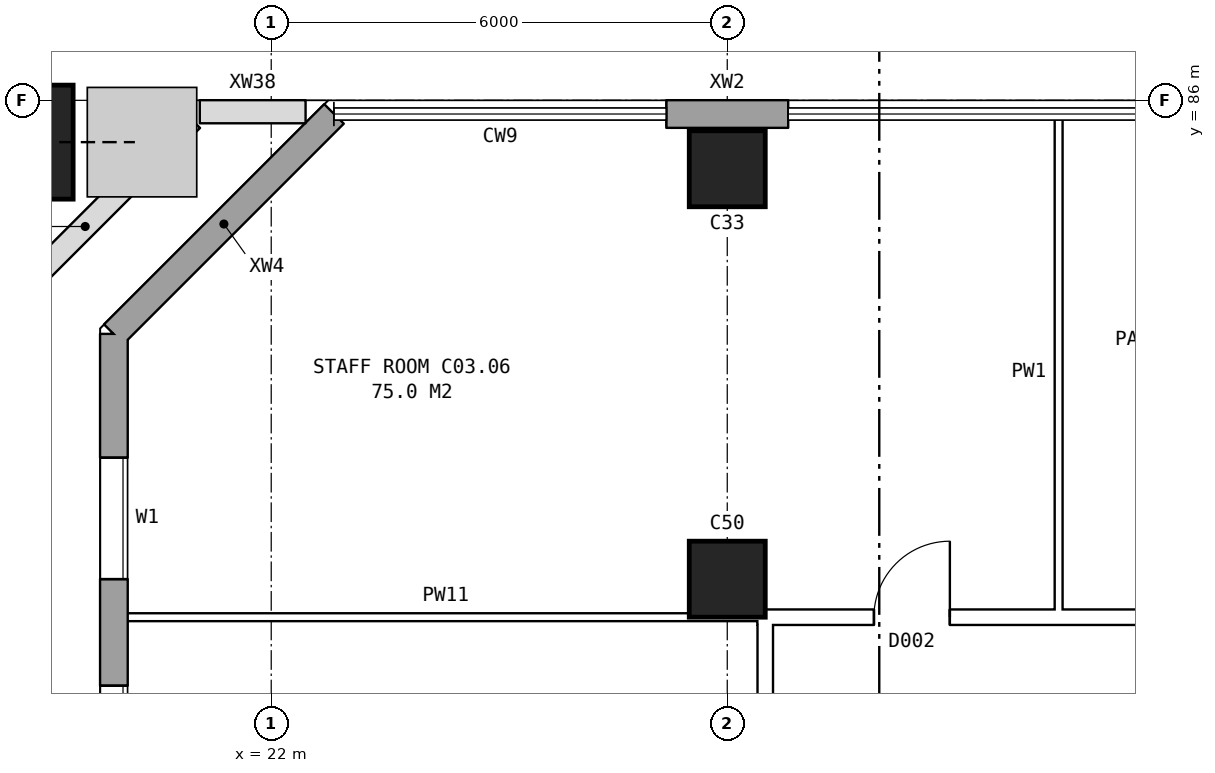
"""IFC4 building model, lengths in metres.
Left out: names, types, materials, properties, quantities, classifications, styles, units other than length and angle.
Written with IfcOpenShell. Run it as: python <this file> out.ifc"""

import sys

from ifc_helpers import new_model, si_unit, direction, frame, frame_2d, origin, origin_2d, place, context, subcontext, project, spatial, rectangle, hollow_rectangle, extrude, element, fill, save


model = new_model("IFC4")
c1 = context("Model", 3, precision=1e-05, world=origin(), true_north=direction((0.0, 1.0)))
c2 = subcontext(c1, "Body", "Model", "MODEL_VIEW")
j1 = project(units=[si_unit("LENGTHUNIT", "METRE"), si_unit("PLANEANGLEUNIT", "RADIAN")], contexts=[c1])
p1 = place(None, origin())
s1 = spatial("IfcSite", under=j1, at=p1, CompositionType="ELEMENT")
p2 = place(p1, origin())
s2 = spatial("IfcBuilding", under=s1, at=p2, CompositionType="ELEMENT")
p3 = place(p2, frame((0.0, 0.0, 14.7)))
s3 = spatial("IfcBuildingStorey", under=s2, at=p3, CompositionType="ELEMENT", Elevation=14.7)
for number, where, z_axis, x_axis in (
    (1, (28.0, 79.7, 0.0), (0.0, 0.0, 1.0), (1.0, 0.0, 0.0)),
    (2, (28.0, 85.1, 0.0), (0.0, 0.0, 1.0), (1.0, 0.0, 0.0)),
):
    element("IfcColumn", number, at=place(p3, frame(where, z_axis=z_axis, x_axis=x_axis)), inside=s3, PredefinedType="COLUMN", context=c2, shape_type="SweptSolid", body=[
        extrude(rectangle(XDim=1.0, YDim=1.0, at=origin_2d()), origin(), (0.0, 0.0, 1.0), 4.0),
    ])
p4 = place(p3, frame((18.644, 85.45, 0.257), z_axis=(0.342481981042, 0.0, 0.939524397055), x_axis=(0.0, 1.0, 0.0)))
e3 = element("IfcColumn", 3, at=p4, inside=s3, PredefinedType="COLUMN", context=c2, shape_type="SweptSolid", body=[
    extrude(hollow_rectangle(XDim=1.5, YDim=1.5, WallThickness=0.08, at=origin_2d()), origin(), (0.0, 0.0, 1.0), 4.562),
])
p5 = place(p3, frame((28.8, 85.82, 0.0), z_axis=(0.0, 0.0, 1.0), x_axis=(-1.0, 0.0, 0.0)))
e4 = element("IfcWall", 4, at=p5, inside=s3, PredefinedType="STANDARD", context=c2, shape_type="SweptSolid", body=[
    extrude(rectangle(XDim=1.6, YDim=0.36, at=frame_2d((0.8, 0.0))), origin(), (0.0, 0.0, 1.0), 4.0),
])
p6 = place(p3, frame((22.825, 85.82, 0.0), z_axis=(0.0, 0.0, 1.0), x_axis=(-0.707106781187, -0.707106781187, 0.0)))
e5 = element("IfcWall", 5, at=p6, inside=s3, PredefinedType="STANDARD", context=c2, shape_type="SweptSolid", body=[
    extrude(rectangle(XDim=4.094, YDim=0.36, at=frame_2d((2.047, 0.0))), origin(), (0.0, 0.0, 1.0), 4.0),
])
p7 = place(p3, frame((19.93, 82.925, 0.0), z_axis=(0.0, 0.0, 1.0), x_axis=(0.0, -1.0, 0.0)))
e6 = element("IfcWall", 6, at=p7, inside=s3, PredefinedType="STANDARD", context=c2, shape_type="SweptSolid", body=[
    extrude(rectangle(XDim=25.851, YDim=0.36, at=frame_2d((12.925, 0.0))), origin(), (0.0, 0.0, 1.0), 4.0),
])
p8 = place(p7, frame((1.625, 0.0, 0.8)))
e7 = element("IfcOpeningElement", 7, at=p8, cuts=e6, PredefinedType="OPENING", context=c2, shape_type="SweptSolid", body=[
    extrude(rectangle(XDim=1.6, YDim=1.8, at=frame_2d((0.8, 0.9))), frame((0.0, 0.19, 0.0), z_axis=(0.0, -1.0, 0.0), x_axis=(1.0, 0.0, 0.0)), (0.0, 0.0, 1.0), 0.38),
])
p9 = place(p7, frame((4.625, 0.0, 0.8)))
e8 = element("IfcOpeningElement", 8, at=p9, cuts=e6, PredefinedType="OPENING", context=c2, shape_type="SweptSolid", body=[
    extrude(rectangle(XDim=1.6, YDim=1.8, at=frame_2d((0.8, 0.9))), frame((0.0, 0.19, 0.0), z_axis=(0.0, -1.0, 0.0), x_axis=(1.0, 0.0, 0.0)), (0.0, 0.0, 1.0), 0.38),
])
p10 = place(p7, frame((7.625, 0.0, 0.8)))
e9 = element("IfcOpeningElement", 9, at=p10, cuts=e6, PredefinedType="OPENING", context=c2, shape_type="SweptSolid", body=[
    extrude(rectangle(XDim=1.6, YDim=1.8, at=frame_2d((0.8, 0.9))), frame((0.0, 0.19, 0.0), z_axis=(0.0, -1.0, 0.0), x_axis=(1.0, 0.0, 0.0)), (0.0, 0.0, 1.0), 0.38),
])
p11 = place(p7, frame((10.625, 0.0, 0.8)))
e10 = element("IfcOpeningElement", 10, at=p11, cuts=e6, PredefinedType="OPENING", context=c2, shape_type="SweptSolid", body=[
    extrude(rectangle(XDim=1.6, YDim=1.8, at=frame_2d((0.8, 0.9))), frame((0.0, 0.19, 0.0), z_axis=(0.0, -1.0, 0.0), x_axis=(1.0, 0.0, 0.0)), (0.0, 0.0, 1.0), 0.38),
])
p12 = place(p7, frame((13.625, 0.0, 0.8)))
e11 = element("IfcOpeningElement", 11, at=p12, cuts=e6, PredefinedType="OPENING", context=c2, shape_type="SweptSolid", body=[
    extrude(rectangle(XDim=1.6, YDim=1.8, at=frame_2d((0.8, 0.9))), frame((0.0, 0.19, 0.0), z_axis=(0.0, -1.0, 0.0), x_axis=(1.0, 0.0, 0.0)), (0.0, 0.0, 1.0), 0.38),
])
p13 = place(p7, frame((16.625, 0.0, 0.8)))
e12 = element("IfcOpeningElement", 12, at=p13, cuts=e6, PredefinedType="OPENING", context=c2, shape_type="SweptSolid", body=[
    extrude(rectangle(XDim=1.6, YDim=1.8, at=frame_2d((0.8, 0.9))), frame((0.0, 0.19, 0.0), z_axis=(0.0, -1.0, 0.0), x_axis=(1.0, 0.0, 0.0)), (0.0, 0.0, 1.0), 0.38),
])
p14 = place(p7, frame((19.625, 0.0, 0.8)))
e13 = element("IfcOpeningElement", 13, at=p14, cuts=e6, PredefinedType="OPENING", context=c2, shape_type="SweptSolid", body=[
    extrude(rectangle(XDim=1.6, YDim=1.8, at=frame_2d((0.8, 0.9))), frame((0.0, 0.19, 0.0), z_axis=(0.0, -1.0, 0.0), x_axis=(1.0, 0.0, 0.0)), (0.0, 0.0, 1.0), 0.38),
])
p15 = place(p7, frame((22.625, 0.0, 0.8)))
e14 = element("IfcOpeningElement", 14, at=p15, cuts=e6, PredefinedType="OPENING", context=c2, shape_type="SweptSolid", body=[
    extrude(rectangle(XDim=1.6, YDim=1.8, at=frame_2d((0.8, 0.9))), frame((0.0, 0.19, 0.0), z_axis=(0.0, -1.0, 0.0), x_axis=(1.0, 0.0, 0.0)), (0.0, 0.0, 1.0), 0.38),
])
p16 = place(p3, frame((22.45, 85.85, 0.0), z_axis=(0.0, 0.0, 1.0), x_axis=(-1.0, 0.0, 0.0)))
e15 = element("IfcWall", 15, at=p16, inside=s3, PredefinedType="PARAPET", context=c2, shape_type="SweptSolid", body=[
    extrude(rectangle(XDim=1.388, YDim=0.3, at=frame_2d((0.694, 0.0))), origin(), (0.0, 0.0, 1.0), 1.1),
])
p17 = place(p3, frame((20.955, 85.742, 0.0), z_axis=(0.0, 0.0, 1.0), x_axis=(-0.707137557743, -0.70707600329, 0.0)))
e16 = element("IfcWall", 16, at=p17, inside=s3, PredefinedType="PARAPET", context=c2, shape_type="SweptSolid", body=[
    extrude(rectangle(XDim=3.966, YDim=0.3, at=frame_2d((1.983, 0.0))), origin(), (0.0, 0.0, 1.0), 1.1),
])
p18 = place(p3, frame((28.398, 79.2, 0.0), z_axis=(0.0, 0.0, 1.0), x_axis=(1.0, 0.0, 0.0)))
e17 = element("IfcWall", 17, at=p18, inside=s3, PredefinedType="PARTITIONING", context=c2, shape_type="SweptSolid", body=[
    extrude(rectangle(XDim=47.362, YDim=0.2, at=frame_2d((23.681, 0.0))), origin(), (0.0, 0.0, 1.0), 4.0),
])
p19 = place(p18, frame((1.531, 0.0, 0.0)))
e18 = element("IfcOpeningElement", 18, at=p19, cuts=e17, PredefinedType="OPENING", context=c2, shape_type="SweptSolid", body=[
    extrude(rectangle(XDim=1.0, YDim=2.1, at=frame_2d((0.5, 1.05))), frame((0.0, 0.11, 0.0), z_axis=(0.0, -1.0, 0.0), x_axis=(1.0, 0.0, 0.0)), (0.0, 0.0, 1.0), 0.22),
])
p20 = place(p18, frame((5.782, 0.0, 0.0)))
e19 = element("IfcOpeningElement", 19, at=p20, cuts=e17, PredefinedType="OPENING", context=c2, shape_type="SweptSolid", body=[
    extrude(rectangle(XDim=1.0, YDim=2.1, at=frame_2d((0.5, 1.05))), frame((0.0, 0.11, 0.0), z_axis=(0.0, -1.0, 0.0), x_axis=(1.0, 0.0, 0.0)), (0.0, 0.0, 1.0), 0.22),
])
p21 = place(p18, frame((12.502, 0.0, 0.0)))
e20 = element("IfcOpeningElement", 20, at=p21, cuts=e17, PredefinedType="OPENING", context=c2, shape_type="SweptSolid", body=[
    extrude(rectangle(XDim=1.0, YDim=2.1, at=frame_2d((0.5, 1.05))), frame((0.0, 0.11, 0.0), z_axis=(0.0, -1.0, 0.0), x_axis=(1.0, 0.0, 0.0)), (0.0, 0.0, 1.0), 0.22),
])
p22 = place(p18, frame((17.102, 0.0, 0.0)))
e21 = element("IfcOpeningElement", 21, at=p22, cuts=e17, PredefinedType="OPENING", context=c2, shape_type="SweptSolid", body=[
    extrude(rectangle(XDim=1.0, YDim=2.1, at=frame_2d((0.5, 1.05))), frame((0.0, 0.11, 0.0), z_axis=(0.0, -1.0, 0.0), x_axis=(1.0, 0.0, 0.0)), (0.0, 0.0, 1.0), 0.22),
])
p23 = place(p18, frame((23.102, 0.0, 0.0)))
e22 = element("IfcOpeningElement", 22, at=p23, cuts=e17, PredefinedType="OPENING", context=c2, shape_type="SweptSolid", body=[
    extrude(rectangle(XDim=1.0, YDim=2.1, at=frame_2d((0.5, 1.05))), frame((0.0, 0.11, 0.0), z_axis=(0.0, -1.0, 0.0), x_axis=(1.0, 0.0, 0.0)), (0.0, 0.0, 1.0), 0.22),
])
p24 = place(p18, frame((29.102, 0.0, 0.0)))
e23 = element("IfcOpeningElement", 23, at=p24, cuts=e17, PredefinedType="OPENING", context=c2, shape_type="SweptSolid", body=[
    extrude(rectangle(XDim=1.0, YDim=2.1, at=frame_2d((0.5, 1.05))), frame((0.0, 0.11, 0.0), z_axis=(0.0, -1.0, 0.0), x_axis=(1.0, 0.0, 0.0)), (0.0, 0.0, 1.0), 0.22),
])
p25 = place(p18, frame((33.652, 0.0, 0.0)))
e24 = element("IfcOpeningElement", 24, at=p25, cuts=e17, PredefinedType="OPENING", context=c2, shape_type="SweptSolid", body=[
    extrude(rectangle(XDim=1.0, YDim=2.1, at=frame_2d((0.5, 1.05))), frame((0.0, 0.11, 0.0), z_axis=(0.0, -1.0, 0.0), x_axis=(1.0, 0.0, 0.0)), (0.0, 0.0, 1.0), 0.22),
])
p26 = place(p18, frame((36.652, 0.0, 0.0)))
e25 = element("IfcOpeningElement", 25, at=p26, cuts=e17, PredefinedType="OPENING", context=c2, shape_type="SweptSolid", body=[
    extrude(rectangle(XDim=1.0, YDim=2.1, at=frame_2d((0.5, 1.05))), frame((0.0, 0.11, 0.0), z_axis=(0.0, -1.0, 0.0), x_axis=(1.0, 0.0, 0.0)), (0.0, 0.0, 1.0), 0.22),
])
p27 = place(p18, frame((39.602, 0.0, 0.0)))
e26 = element("IfcOpeningElement", 26, at=p27, cuts=e17, PredefinedType="OPENING", context=c2, shape_type="SweptSolid", body=[
    extrude(rectangle(XDim=1.0, YDim=2.1, at=frame_2d((0.5, 1.05))), frame((0.0, 0.11, 0.0), z_axis=(0.0, -1.0, 0.0), x_axis=(1.0, 0.0, 0.0)), (0.0, 0.0, 1.0), 0.22),
])
p28 = place(p18, frame((42.502, 0.0, 0.0)))
e27 = element("IfcOpeningElement", 27, at=p28, cuts=e17, PredefinedType="OPENING", context=c2, shape_type="SweptSolid", body=[
    extrude(rectangle(XDim=1.0, YDim=2.1, at=frame_2d((0.5, 1.05))), frame((0.0, 0.11, 0.0), z_axis=(0.0, -1.0, 0.0), x_axis=(1.0, 0.0, 0.0)), (0.0, 0.0, 1.0), 0.22),
])
p29 = place(p18, frame((45.322, 0.0, 0.0)))
e28 = element("IfcOpeningElement", 28, at=p29, cuts=e17, PredefinedType="OPENING", context=c2, shape_type="SweptSolid", body=[
    extrude(rectangle(XDim=1.0, YDim=2.1, at=frame_2d((0.5, 1.05))), frame((0.0, 0.11, 0.0), z_axis=(0.0, -1.0, 0.0), x_axis=(1.0, 0.0, 0.0)), (0.0, 0.0, 1.0), 0.22),
])
p30 = place(p3, frame((19.99, 79.2, 0.0), z_axis=(0.0, 0.0, 1.0), x_axis=(1.0, 0.0, 0.0)))
e29 = element("IfcWall", 29, at=p30, inside=s3, PredefinedType="PARTITIONING", context=c2, shape_type="SweptSolid", body=[
    extrude(rectangle(XDim=8.612, YDim=0.1, at=frame_2d((4.306, 0.0))), origin(), (0.0, 0.0, 1.0), 4.0),
])
p31 = place(p3, frame((28.5, 60.7, 0.0), z_axis=(0.0, 0.0, 1.0), x_axis=(0.0, 1.0, 0.0)))
e30 = element("IfcWall", 30, at=p31, inside=s3, PredefinedType="PARTITIONING", context=c2, shape_type="SweptSolid", body=[
    extrude(rectangle(XDim=18.6, YDim=0.2, at=frame_2d((9.3, 0.0))), origin(), (0.0, 0.0, 1.0), 4.0),
])
p32 = place(p31, frame((1.1, 0.0, 0.0)))
e31 = element("IfcOpeningElement", 31, at=p32, cuts=e30, PredefinedType="OPENING", context=c2, shape_type="SweptSolid", body=[
    extrude(rectangle(XDim=1.2, YDim=2.1, at=frame_2d((0.6, 1.05))), frame((0.0, 0.11, 0.0), z_axis=(0.0, -1.0, 0.0), x_axis=(1.0, 0.0, 0.0)), (0.0, 0.0, 1.0), 0.22),
])
p33 = place(p31, frame((7.2, 0.0, 0.0)))
e32 = element("IfcOpeningElement", 32, at=p33, cuts=e30, PredefinedType="OPENING", context=c2, shape_type="SweptSolid", body=[
    extrude(rectangle(XDim=1.2, YDim=2.1, at=frame_2d((0.6, 1.05))), frame((0.0, 0.11, 0.0), z_axis=(0.0, -1.0, 0.0), x_axis=(1.0, 0.0, 0.0)), (0.0, 0.0, 1.0), 0.22),
])
p34 = place(p31, frame((14.9, 0.0, 0.0)))
e33 = element("IfcOpeningElement", 33, at=p34, cuts=e30, PredefinedType="OPENING", context=c2, shape_type="SweptSolid", body=[
    extrude(rectangle(XDim=1.0, YDim=2.1, at=frame_2d((0.5, 1.05))), frame((0.0, 0.11, 0.0), z_axis=(0.0, -1.0, 0.0), x_axis=(1.0, 0.0, 0.0)), (0.0, 0.0, 1.0), 0.22),
])
p35 = place(p3, frame((32.36, 79.1, 0.0), z_axis=(0.0, 0.0, 1.0), x_axis=(0.0, 1.0, 0.0)))
e34 = element("IfcWall", 34, at=p35, inside=s3, PredefinedType="PARTITIONING", context=c2, shape_type="SweptSolid", body=[
    extrude(rectangle(XDim=6.66, YDim=0.1, at=frame_2d((3.33, 0.0))), origin(), (0.0, 0.0, 1.0), 4.0),
])
p36 = place(p8, origin())
e35 = element("IfcWindow", 35, at=p36, inside=s3, PartitioningType="SINGLE_PANEL", PredefinedType="WINDOW", context=c2, shape_type="SweptSolid", body=[
    extrude(rectangle(XDim=1.6, YDim=1.8, at=frame_2d((0.8, 0.9))), frame((0.0, 0.15, 0.0), z_axis=(0.0, -1.0, 0.0), x_axis=(1.0, 0.0, 0.0)), (0.0, 0.0, 1.0), 0.06),
])
fill(e7, e35)
p37 = place(p9, origin())
e36 = element("IfcWindow", 36, at=p37, inside=s3, PartitioningType="SINGLE_PANEL", PredefinedType="WINDOW", context=c2, shape_type="SweptSolid", body=[
    extrude(rectangle(XDim=1.6, YDim=1.8, at=frame_2d((0.8, 0.9))), frame((0.0, 0.15, 0.0), z_axis=(0.0, -1.0, 0.0), x_axis=(1.0, 0.0, 0.0)), (0.0, 0.0, 1.0), 0.06),
])
fill(e8, e36)
p38 = place(p19, origin())
e37 = element("IfcDoor", 37, at=p38, inside=s3, OperationType="SINGLE_SWING_RIGHT", PredefinedType="DOOR", context=c2, shape_type="SweptSolid", body=[
    extrude(rectangle(XDim=1.0, YDim=2.1, at=frame_2d((0.5, 1.05))), frame((0.0, 0.025, 0.0), z_axis=(0.0, -1.0, 0.0), x_axis=(1.0, 0.0, 0.0)), (0.0, 0.0, 1.0), 0.05),
])
fill(e18, e37)
save(model, sys.argv[1])
